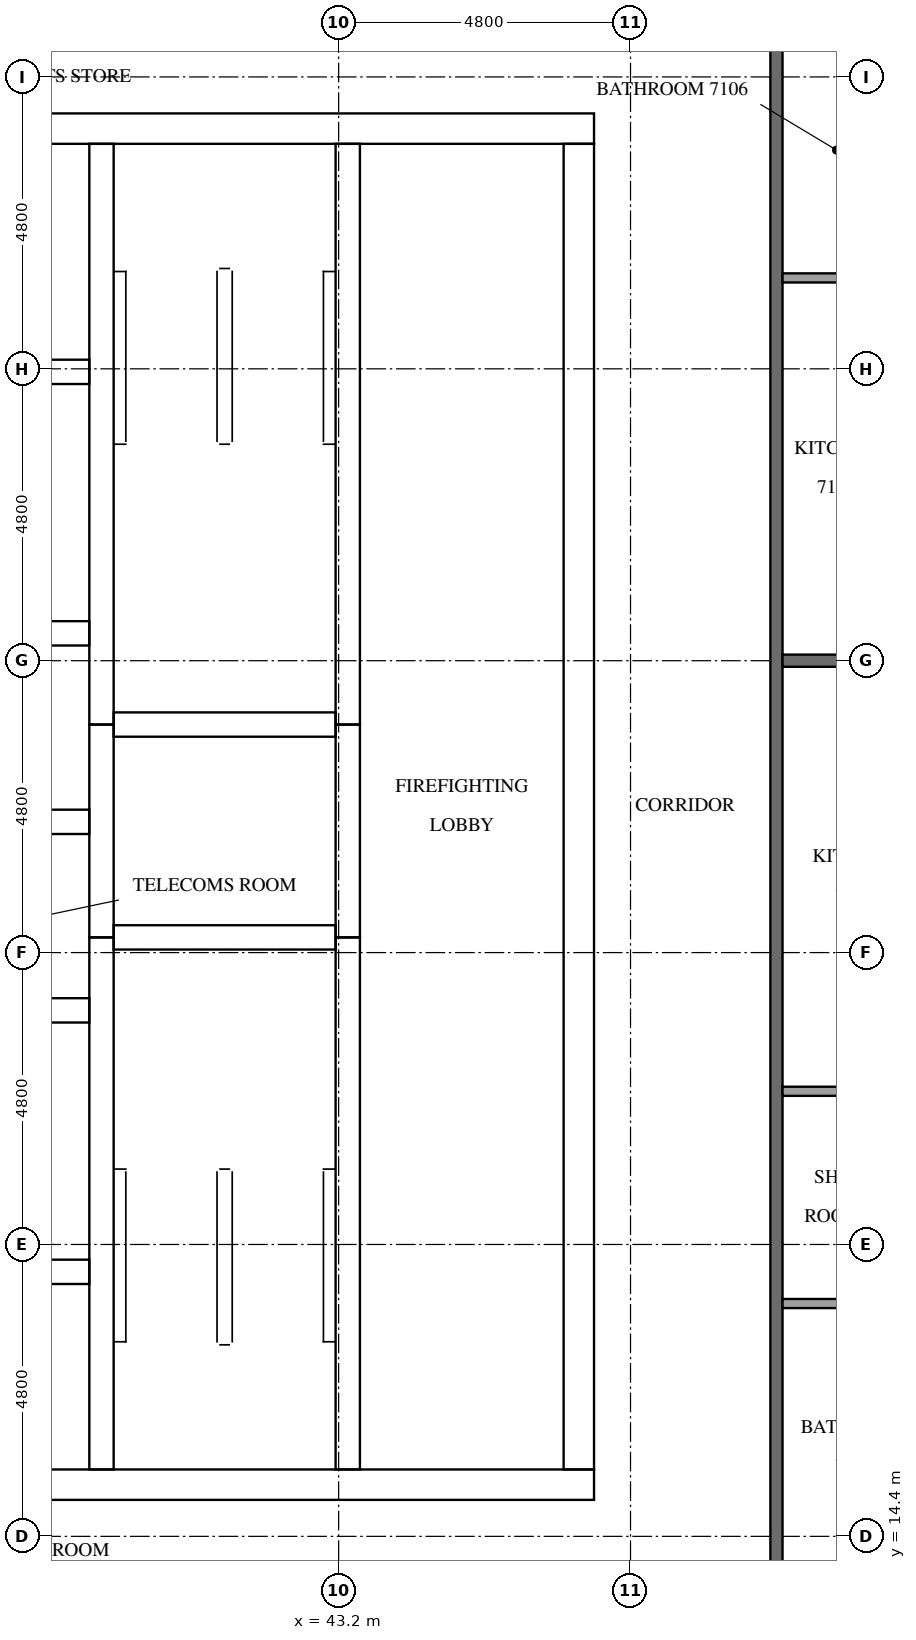
"""IFC4 building model, lengths in metres.
Left out: names, types, materials, properties, quantities, classifications, styles, units other than length and angle.
Written with IfcOpenShell. Run it as: python <this file> out.ifc"""

import sys

from ifc_helpers import new_model, si_unit, direction, frame, frame_2d, origin, place, context, subcontext, project, spatial, rectangle, extrude, element, fill, save


model = new_model("IFC4")
c1 = context("Model", 3, precision=1e-05, world=origin(), true_north=direction((0.0, 1.0)))
c2 = subcontext(c1, "Body", "Model", "MODEL_VIEW")
j1 = project(units=[si_unit("LENGTHUNIT", "METRE"), si_unit("PLANEANGLEUNIT", "RADIAN")], contexts=[c1])
p1 = place(None, origin())
s1 = spatial("IfcSite", under=j1, at=p1, CompositionType="ELEMENT")
p2 = place(p1, origin())
s2 = spatial("IfcBuilding", under=s1, at=p2, CompositionType="ELEMENT")
p3 = place(p2, frame((0.0, 0.0, 272.1)))
s3 = spatial("IfcBuildingStorey", under=s2, at=p3, CompositionType="ELEMENT", Elevation=272.1)
p4 = place(p3, frame((15.0, 15.25, 0.0), z_axis=(0.0, 0.0, 1.0), x_axis=(1.0, 0.0, 0.0)))
e1 = element("IfcWall", 1, at=p4, inside=s3, PredefinedType="SHEAR", context=c2, shape_type="SweptSolid", body=[
    extrude(rectangle(XDim=32.4, YDim=0.5, at=frame_2d((16.2, 0.0))), origin(), (0.0, 0.0, 1.0), 3.2),
])
p5 = place(p4, frame((15.3, 0.0, 0.0)))
e2 = element("IfcOpeningElement", 2, at=p5, cuts=e1, PredefinedType="OPENING", context=c2, shape_type="SweptSolid", body=[
    extrude(rectangle(XDim=1.8, YDim=2.1, at=frame_2d((0.9, 1.05))), frame((0.0, 0.26, 0.0), z_axis=(0.0, -1.0, 0.0), x_axis=(1.0, 0.0, 0.0)), (0.0, 0.0, 1.0), 0.52),
])
p6 = place(p3, frame((15.0, 37.55, 0.0), z_axis=(0.0, 0.0, 1.0), x_axis=(1.0, 0.0, 0.0)))
e3 = element("IfcWall", 3, at=p6, inside=s3, PredefinedType="SHEAR", context=c2, shape_type="SweptSolid", body=[
    extrude(rectangle(XDim=32.4, YDim=0.5, at=frame_2d((16.2, 0.0))), origin(), (0.0, 0.0, 1.0), 3.2),
])
p7 = place(p6, frame((15.3, 0.0, 0.0)))
e4 = element("IfcOpeningElement", 4, at=p7, cuts=e3, PredefinedType="OPENING", context=c2, shape_type="SweptSolid", body=[
    extrude(rectangle(XDim=1.8, YDim=2.1, at=frame_2d((0.9, 1.05))), frame((0.0, 0.26, 0.0), z_axis=(0.0, -1.0, 0.0), x_axis=(1.0, 0.0, 0.0)), (0.0, 0.0, 1.0), 0.52),
])
p8 = place(p6, frame((1.282, 0.0, 0.0)))
e5 = element("IfcOpeningElement", 5, at=p8, cuts=e3, PredefinedType="OPENING", context=c2, shape_type="SweptSolid", body=[
    extrude(rectangle(XDim=1.0, YDim=2.1, at=frame_2d((0.5, 1.05))), frame((0.0, 0.26, 0.0), z_axis=(0.0, -1.0, 0.0), x_axis=(1.0, 0.0, 0.0)), (0.0, 0.0, 1.0), 0.52),
])
p9 = place(p6, frame((5.082, 0.0, 0.0)))
e6 = element("IfcOpeningElement", 6, at=p9, cuts=e3, PredefinedType="OPENING", context=c2, shape_type="SweptSolid", body=[
    extrude(rectangle(XDim=1.0, YDim=2.1, at=frame_2d((0.5, 1.05))), frame((0.0, 0.26, 0.0), z_axis=(0.0, -1.0, 0.0), x_axis=(1.0, 0.0, 0.0)), (0.0, 0.0, 1.0), 0.52),
])
p10 = place(p3, frame((47.15, 15.5, 0.0), z_axis=(0.0, 0.0, 1.0), x_axis=(0.0, 1.0, 0.0)))
e7 = element("IfcWall", 7, at=p10, inside=s3, PredefinedType="SHEAR", context=c2, shape_type="SweptSolid", body=[
    extrude(rectangle(XDim=21.8, YDim=0.5, at=frame_2d((10.9, 0.0))), origin(), (0.0, 0.0, 1.0), 3.2),
])
p11 = place(p10, frame((10.6, 0.0, 0.0)))
e8 = element("IfcOpeningElement", 8, at=p11, cuts=e7, PredefinedType="OPENING", context=c2, shape_type="SweptSolid", body=[
    extrude(rectangle(XDim=1.2, YDim=2.1, at=frame_2d((0.6, 1.05))), frame((0.0, 0.26, 0.0), z_axis=(0.0, -1.0, 0.0), x_axis=(1.0, 0.0, 0.0)), (0.0, 0.0, 1.0), 0.52),
])
p12 = place(p3, frame((39.3, 15.5, 0.0), z_axis=(0.0, 0.0, 1.0), x_axis=(0.0, 1.0, 0.0)))
e9 = element("IfcWall", 9, at=p12, inside=s3, PredefinedType="SHEAR", context=c2, shape_type="SweptSolid", body=[
    extrude(rectangle(XDim=8.75, YDim=0.4, at=frame_2d((4.375, 0.0))), origin(), (0.0, 0.0, 1.0), 3.2),
])
p13 = place(p3, frame((39.3, 24.25, 0.0), z_axis=(0.0, 0.0, 1.0), x_axis=(0.0, 1.0, 0.0)))
e10 = element("IfcWall", 10, at=p13, inside=s3, PredefinedType="SHEAR", context=c2, shape_type="SweptSolid", body=[
    extrude(rectangle(XDim=3.5, YDim=0.4, at=frame_2d((1.75, 0.0))), origin(), (0.0, 0.0, 1.0), 3.2),
])
p14 = place(p3, frame((39.3, 27.75, 0.0), z_axis=(0.0, 0.0, 1.0), x_axis=(0.0, 1.0, 0.0)))
e11 = element("IfcWall", 11, at=p14, inside=s3, PredefinedType="SHEAR", context=c2, shape_type="SweptSolid", body=[
    extrude(rectangle(XDim=9.55, YDim=0.4, at=frame_2d((4.775, 0.0))), origin(), (0.0, 0.0, 1.0), 3.2),
])
p15 = place(p3, frame((43.35, 15.5, 0.0), z_axis=(0.0, 0.0, 1.0), x_axis=(0.0, 1.0, 0.0)))
e12 = element("IfcWall", 12, at=p15, inside=s3, PredefinedType="SHEAR", context=c2, shape_type="SweptSolid", body=[
    extrude(rectangle(XDim=8.75, YDim=0.4, at=frame_2d((4.375, 0.0))), origin(), (0.0, 0.0, 1.0), 3.2),
])
p16 = place(p15, frame((0.7, 0.0, 0.0)))
e13 = element("IfcOpeningElement", 13, at=p16, cuts=e12, PredefinedType="OPENING", context=c2, shape_type="SweptSolid", body=[
    extrude(rectangle(XDim=1.2, YDim=2.1, at=frame_2d((0.6, 1.05))), frame((0.0, 0.21, 0.0), z_axis=(0.0, -1.0, 0.0), x_axis=(1.0, 0.0, 0.0)), (0.0, 0.0, 1.0), 0.42),
])
p17 = place(p3, frame((43.35, 24.25, 0.0), z_axis=(0.0, 0.0, 1.0), x_axis=(0.0, 1.0, 0.0)))
e14 = element("IfcWall", 14, at=p17, inside=s3, PredefinedType="SHEAR", context=c2, shape_type="SweptSolid", body=[
    extrude(rectangle(XDim=3.5, YDim=0.4, at=frame_2d((1.75, 0.0))), origin(), (0.0, 0.0, 1.0), 3.2),
])
p18 = place(p17, frame((1.2, 0.0, 0.0)))
e15 = element("IfcOpeningElement", 15, at=p18, cuts=e14, PredefinedType="OPENING", context=c2, shape_type="SweptSolid", body=[
    extrude(rectangle(XDim=1.1, YDim=2.1, at=frame_2d((0.55, 1.05))), frame((0.0, 0.21, 0.0), z_axis=(0.0, -1.0, 0.0), x_axis=(1.0, 0.0, 0.0)), (0.0, 0.0, 1.0), 0.42),
])
p19 = place(p3, frame((43.35, 27.75, 0.0), z_axis=(0.0, 0.0, 1.0), x_axis=(0.0, 1.0, 0.0)))
e16 = element("IfcWall", 16, at=p19, inside=s3, PredefinedType="SHEAR", context=c2, shape_type="SweptSolid", body=[
    extrude(rectangle(XDim=9.55, YDim=0.4, at=frame_2d((4.775, 0.0))), origin(), (0.0, 0.0, 1.0), 3.2),
])
p20 = place(p19, frame((7.65, 0.0, 0.0)))
e17 = element("IfcOpeningElement", 17, at=p20, cuts=e16, PredefinedType="OPENING", context=c2, shape_type="SweptSolid", body=[
    extrude(rectangle(XDim=1.2, YDim=2.1, at=frame_2d((0.6, 1.05))), frame((0.0, 0.21, 0.0), z_axis=(0.0, -1.0, 0.0), x_axis=(1.0, 0.0, 0.0)), (0.0, 0.0, 1.0), 0.42),
])
for number, where, z_axis, x_axis in (
    (18, (39.5, 24.25, 0.0), (0.0, 0.0, 1.0), (1.0, 0.0, 0.0)),
    (19, (39.5, 27.75, 0.0), (0.0, 0.0, 1.0), (1.0, 0.0, 0.0)),
):
    element("IfcWall", number, at=place(p3, frame(where, z_axis=z_axis, x_axis=x_axis)), inside=s3, PredefinedType="SHEAR", context=c2, shape_type="SweptSolid", body=[
        extrude(rectangle(XDim=3.65, YDim=0.4, at=frame_2d((1.825, 0.0))), origin(), (0.0, 0.0, 1.0), 3.2),
    ])
p21 = place(p3, frame((33.5, 18.75, 0.0), z_axis=(0.0, 0.0, 1.0), x_axis=(1.0, 0.0, 0.0)))
e20 = element("IfcWall", 20, at=p21, inside=s3, PredefinedType="SHEAR", context=c2, shape_type="SweptSolid", body=[
    extrude(rectangle(XDim=5.6, YDim=0.4, at=frame_2d((2.8, 0.0))), origin(), (0.0, 0.0, 1.0), 3.2),
])
p22 = place(p21, frame((1.384, 0.0, 0.0)))
e21 = element("IfcOpeningElement", 21, at=p22, cuts=e20, PredefinedType="OPENING", context=c2, shape_type="SweptSolid", body=[
    extrude(rectangle(XDim=1.0, YDim=2.1, at=frame_2d((0.5, 1.05))), frame((0.0, 0.21, 0.0), z_axis=(0.0, -1.0, 0.0), x_axis=(1.0, 0.0, 0.0)), (0.0, 0.0, 1.0), 0.42),
])
p23 = place(p21, frame((4.084, 0.0, 0.0)))
e22 = element("IfcOpeningElement", 22, at=p23, cuts=e20, PredefinedType="OPENING", context=c2, shape_type="SweptSolid", body=[
    extrude(rectangle(XDim=1.0, YDim=2.1, at=frame_2d((0.5, 1.05))), frame((0.0, 0.21, 0.0), z_axis=(0.0, -1.0, 0.0), x_axis=(1.0, 0.0, 0.0)), (0.0, 0.0, 1.0), 0.42),
])
p24 = place(p3, frame((23.3, 23.05, 0.0), z_axis=(0.0, 0.0, 1.0), x_axis=(1.0, 0.0, 0.0)))
e23 = element("IfcWall", 23, at=p24, inside=s3, PredefinedType="SHEAR", context=c2, shape_type="SweptSolid", body=[
    extrude(rectangle(XDim=15.8, YDim=0.4, at=frame_2d((7.9, 0.0))), origin(), (0.0, 0.0, 1.0), 3.2),
])
p25 = place(p24, frame((2.067, 0.0, 0.0)))
e24 = element("IfcOpeningElement", 24, at=p25, cuts=e23, PredefinedType="OPENING", context=c2, shape_type="SweptSolid", body=[
    extrude(rectangle(XDim=1.0, YDim=2.1, at=frame_2d((0.5, 1.05))), frame((0.0, 0.21, 0.0), z_axis=(0.0, -1.0, 0.0), x_axis=(1.0, 0.0, 0.0)), (0.0, 0.0, 1.0), 0.42),
])
p26 = place(p24, frame((11.862, 0.0, 0.0)))
e25 = element("IfcOpeningElement", 25, at=p26, cuts=e23, PredefinedType="OPENING", context=c2, shape_type="SweptSolid", body=[
    extrude(rectangle(XDim=1.0, YDim=2.1, at=frame_2d((0.5, 1.05))), frame((0.0, 0.21, 0.0), z_axis=(0.0, -1.0, 0.0), x_axis=(1.0, 0.0, 0.0)), (0.0, 0.0, 1.0), 0.42),
])
p27 = place(p24, frame((14.529, 0.0, 0.0)))
e26 = element("IfcOpeningElement", 26, at=p27, cuts=e23, PredefinedType="OPENING", context=c2, shape_type="SweptSolid", body=[
    extrude(rectangle(XDim=1.0, YDim=2.1, at=frame_2d((0.5, 1.05))), frame((0.0, 0.21, 0.0), z_axis=(0.0, -1.0, 0.0), x_axis=(1.0, 0.0, 0.0)), (0.0, 0.0, 1.0), 0.42),
])
p28 = place(p3, frame((23.3, 26.15, 0.0), z_axis=(0.0, 0.0, 1.0), x_axis=(1.0, 0.0, 0.0)))
e27 = element("IfcWall", 27, at=p28, inside=s3, PredefinedType="SHEAR", context=c2, shape_type="SweptSolid", body=[
    extrude(rectangle(XDim=15.8, YDim=0.4, at=frame_2d((7.9, 0.0))), origin(), (0.0, 0.0, 1.0), 3.2),
])
p29 = place(p3, frame((23.3, 29.25, 0.0), z_axis=(0.0, 0.0, 1.0), x_axis=(1.0, 0.0, 0.0)))
e28 = element("IfcWall", 28, at=p29, inside=s3, PredefinedType="SHEAR", context=c2, shape_type="SweptSolid", body=[
    extrude(rectangle(XDim=15.8, YDim=0.4, at=frame_2d((7.9, 0.0))), origin(), (0.0, 0.0, 1.0), 3.2),
])
p30 = place(p29, frame((0.683, 0.0, 0.0)))
e29 = element("IfcOpeningElement", 29, at=p30, cuts=e28, PredefinedType="OPENING", context=c2, shape_type="SweptSolid", body=[
    extrude(rectangle(XDim=1.1, YDim=2.1, at=frame_2d((0.55, 1.05))), frame((0.0, 0.21, 0.0), z_axis=(0.0, -1.0, 0.0), x_axis=(1.0, 0.0, 0.0)), (0.0, 0.0, 1.0), 0.42),
])
p31 = place(p29, frame((3.35, 0.0, 0.0)))
e30 = element("IfcOpeningElement", 30, at=p31, cuts=e28, PredefinedType="OPENING", context=c2, shape_type="SweptSolid", body=[
    extrude(rectangle(XDim=1.1, YDim=2.1, at=frame_2d((0.55, 1.05))), frame((0.0, 0.21, 0.0), z_axis=(0.0, -1.0, 0.0), x_axis=(1.0, 0.0, 0.0)), (0.0, 0.0, 1.0), 0.42),
])
p32 = place(p29, frame((6.017, 0.0, 0.0)))
e31 = element("IfcOpeningElement", 31, at=p32, cuts=e28, PredefinedType="OPENING", context=c2, shape_type="SweptSolid", body=[
    extrude(rectangle(XDim=1.1, YDim=2.1, at=frame_2d((0.55, 1.05))), frame((0.0, 0.21, 0.0), z_axis=(0.0, -1.0, 0.0), x_axis=(1.0, 0.0, 0.0)), (0.0, 0.0, 1.0), 0.42),
])
p33 = place(p29, frame((8.683, 0.0, 0.0)))
e32 = element("IfcOpeningElement", 32, at=p33, cuts=e28, PredefinedType="OPENING", context=c2, shape_type="SweptSolid", body=[
    extrude(rectangle(XDim=1.1, YDim=2.1, at=frame_2d((0.55, 1.05))), frame((0.0, 0.21, 0.0), z_axis=(0.0, -1.0, 0.0), x_axis=(1.0, 0.0, 0.0)), (0.0, 0.0, 1.0), 0.42),
])
p34 = place(p29, frame((11.35, 0.0, 0.0)))
e33 = element("IfcOpeningElement", 33, at=p34, cuts=e28, PredefinedType="OPENING", context=c2, shape_type="SweptSolid", body=[
    extrude(rectangle(XDim=1.1, YDim=2.1, at=frame_2d((0.55, 1.05))), frame((0.0, 0.21, 0.0), z_axis=(0.0, -1.0, 0.0), x_axis=(1.0, 0.0, 0.0)), (0.0, 0.0, 1.0), 0.42),
])
p35 = place(p29, frame((14.017, 0.0, 0.0)))
e34 = element("IfcOpeningElement", 34, at=p35, cuts=e28, PredefinedType="OPENING", context=c2, shape_type="SweptSolid", body=[
    extrude(rectangle(XDim=1.1, YDim=2.1, at=frame_2d((0.55, 1.05))), frame((0.0, 0.21, 0.0), z_axis=(0.0, -1.0, 0.0), x_axis=(1.0, 0.0, 0.0)), (0.0, 0.0, 1.0), 0.42),
])
p36 = place(p3, frame((33.5, 33.55, 0.0), z_axis=(0.0, 0.0, 1.0), x_axis=(1.0, 0.0, 0.0)))
e35 = element("IfcWall", 35, at=p36, inside=s3, PredefinedType="SHEAR", context=c2, shape_type="SweptSolid", body=[
    extrude(rectangle(XDim=5.6, YDim=0.4, at=frame_2d((2.8, 0.0))), origin(), (0.0, 0.0, 1.0), 3.2),
])
p37 = place(p36, frame((1.696, 0.0, 0.0)))
e36 = element("IfcOpeningElement", 36, at=p37, cuts=e35, PredefinedType="OPENING", context=c2, shape_type="SweptSolid", body=[
    extrude(rectangle(XDim=1.0, YDim=2.1, at=frame_2d((0.5, 1.05))), frame((0.0, 0.21, 0.0), z_axis=(0.0, -1.0, 0.0), x_axis=(1.0, 0.0, 0.0)), (0.0, 0.0, 1.0), 0.42),
])
p38 = place(p36, frame((4.396, 0.0, 0.0)))
e37 = element("IfcOpeningElement", 37, at=p38, cuts=e35, PredefinedType="OPENING", context=c2, shape_type="SweptSolid", body=[
    extrude(rectangle(XDim=1.0, YDim=2.1, at=frame_2d((0.5, 1.05))), frame((0.0, 0.21, 0.0), z_axis=(0.0, -1.0, 0.0), x_axis=(1.0, 0.0, 0.0)), (0.0, 0.0, 1.0), 0.42),
])
p39 = place(p3, frame((50.4, 40.7, 0.0), z_axis=(0.0, 0.0, 1.0), x_axis=(0.0, -1.0, 0.0)))
e38 = element("IfcWall", 38, at=p39, inside=s3, PredefinedType="PARTITIONING", context=c2, shape_type="SweptSolid", body=[
    extrude(rectangle(XDim=28.6, YDim=0.2, at=frame_2d((14.3, 0.0))), origin(), (0.0, 0.0, 1.0), 3.2),
])
p40 = place(p39, frame((27.425, 0.0, 0.0)))
e39 = element("IfcOpeningElement", 39, at=p40, cuts=e38, PredefinedType="OPENING", context=c2, shape_type="SweptSolid", body=[
    extrude(rectangle(XDim=1.0, YDim=2.1, at=frame_2d((0.5, 1.05))), frame((0.0, 0.11, 0.0), z_axis=(0.0, -1.0, 0.0), x_axis=(1.0, 0.0, 0.0)), (0.0, 0.0, 1.0), 0.22),
])
p41 = place(p39, frame((0.175, 0.0, 0.0)))
e40 = element("IfcOpeningElement", 40, at=p41, cuts=e38, PredefinedType="OPENING", context=c2, shape_type="SweptSolid", body=[
    extrude(rectangle(XDim=1.0, YDim=2.1, at=frame_2d((0.5, 1.05))), frame((0.0, 0.11, 0.0), z_axis=(0.0, -1.0, 0.0), x_axis=(1.0, 0.0, 0.0)), (0.0, 0.0, 1.0), 0.22),
])
p42 = place(p3, frame((50.5, 28.8, 0.0), z_axis=(0.0, 0.0, 1.0), x_axis=(1.0, 0.0, 0.0)))
e41 = element("IfcWall", 41, at=p42, inside=s3, PredefinedType="PARTITIONING", context=c2, shape_type="SweptSolid", body=[
    extrude(rectangle(XDim=7.0, YDim=0.2, at=frame_2d((3.5, 0.0))), origin(), (0.0, 0.0, 1.0), 3.2),
])
for number, where, z_axis, x_axis in (
    (42, (50.5, 18.229, 0.0), (0.0, 0.0, 1.0), (1.0, 0.0, 0.0)),
    (43, (50.5, 21.719, 0.0), (0.0, 0.0, 1.0), (1.0, 0.0, 0.0)),
):
    element("IfcWall", number, at=place(p3, frame(where, z_axis=z_axis, x_axis=x_axis)), inside=s3, PredefinedType="PARTITIONING", context=c2, shape_type="SweptSolid", body=[
        extrude(rectangle(XDim=2.375, YDim=0.15, at=frame_2d((1.188, 0.0))), origin(), (0.0, 0.0, 1.0), 3.2),
    ])
p43 = place(p3, frame((50.5, 35.095, 0.0), z_axis=(0.0, 0.0, 1.0), x_axis=(1.0, 0.0, 0.0)))
e44 = element("IfcWall", 44, at=p43, inside=s3, PredefinedType="PARTITIONING", context=c2, shape_type="SweptSolid", body=[
    extrude(rectangle(XDim=1.775, YDim=0.15, at=frame_2d((0.887, 0.0))), origin(), (0.0, 0.0, 1.0), 3.2),
])
p44 = place(p18, origin())
e45 = element("IfcDoor", 45, at=p44, inside=s3, OperationType="DOUBLE_DOOR_SLIDING", PredefinedType="DOOR", context=c2, shape_type="SweptSolid", body=[
    extrude(rectangle(XDim=1.1, YDim=2.1, at=frame_2d((0.55, 1.05))), frame((0.0, 0.025, 0.0), z_axis=(0.0, -1.0, 0.0), x_axis=(1.0, 0.0, 0.0)), (0.0, 0.0, 1.0), 0.05),
])
fill(e15, e45)
p45 = place(p16, origin())
e46 = element("IfcDoor", 46, at=p45, inside=s3, OperationType="SINGLE_SWING_RIGHT", PredefinedType="DOOR", context=c2, shape_type="SweptSolid", body=[
    extrude(rectangle(XDim=1.2, YDim=2.1, at=frame_2d((0.6, 1.05))), frame((0.0, 0.025, 0.0), z_axis=(0.0, -1.0, 0.0), x_axis=(1.0, 0.0, 0.0)), (0.0, 0.0, 1.0), 0.05),
])
fill(e13, e46)
p46 = place(p20, origin())
e47 = element("IfcDoor", 47, at=p46, inside=s3, OperationType="SINGLE_SWING_LEFT", PredefinedType="DOOR", context=c2, shape_type="SweptSolid", body=[
    extrude(rectangle(XDim=1.2, YDim=2.1, at=frame_2d((0.6, 1.05))), frame((0.0, 0.025, 0.0), z_axis=(0.0, -1.0, 0.0), x_axis=(1.0, 0.0, 0.0)), (0.0, 0.0, 1.0), 0.05),
])
fill(e17, e47)
p47 = place(p11, origin())
e48 = element("IfcDoor", 48, at=p47, inside=s3, OperationType="SINGLE_SWING_LEFT", PredefinedType="DOOR", context=c2, shape_type="SweptSolid", body=[
    extrude(rectangle(XDim=1.2, YDim=2.1, at=frame_2d((0.6, 1.05))), frame((0.0, 0.025, 0.0), z_axis=(0.0, -1.0, 0.0), x_axis=(1.0, 0.0, 0.0)), (0.0, 0.0, 1.0), 0.05),
])
fill(e8, e48)
p48 = place(p27, frame((1.0, 0.0, 0.0), z_axis=(0.0, 0.0, 1.0), x_axis=(-1.0, 0.0, 0.0)))
e49 = element("IfcDoor", 49, at=p48, inside=s3, OperationType="SINGLE_SWING_RIGHT", PredefinedType="DOOR", context=c2, shape_type="SweptSolid", body=[
    extrude(rectangle(XDim=1.0, YDim=2.1, at=frame_2d((0.5, 1.05))), frame((0.0, 0.025, 0.0), z_axis=(0.0, -1.0, 0.0), x_axis=(1.0, 0.0, 0.0)), (0.0, 0.0, 1.0), 0.05),
])
fill(e26, e49)
p49 = place(p23, origin())
e50 = element("IfcDoor", 50, at=p49, inside=s3, OperationType="SINGLE_SWING_RIGHT", PredefinedType="DOOR", context=c2, shape_type="SweptSolid", body=[
    extrude(rectangle(XDim=1.0, YDim=2.1, at=frame_2d((0.5, 1.05))), frame((0.0, 0.025, 0.0), z_axis=(0.0, -1.0, 0.0), x_axis=(1.0, 0.0, 0.0)), (0.0, 0.0, 1.0), 0.05),
])
fill(e22, e50)
p50 = place(p38, frame((1.0, 0.0, 0.0), z_axis=(0.0, 0.0, 1.0), x_axis=(-1.0, 0.0, 0.0)))
e51 = element("IfcDoor", 51, at=p50, inside=s3, OperationType="SINGLE_SWING_RIGHT", PredefinedType="DOOR", context=c2, shape_type="SweptSolid", body=[
    extrude(rectangle(XDim=1.0, YDim=2.1, at=frame_2d((0.5, 1.05))), frame((0.0, 0.025, 0.0), z_axis=(0.0, -1.0, 0.0), x_axis=(1.0, 0.0, 0.0)), (0.0, 0.0, 1.0), 0.05),
])
fill(e37, e51)
save(model, sys.argv[1])
